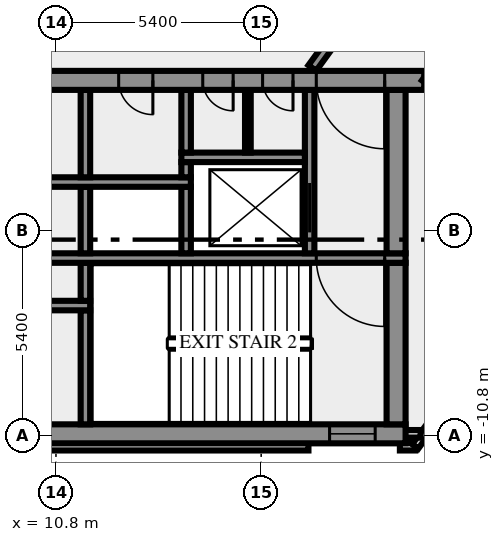
"""IFC4 building model, lengths in metres.
Left out: names, types, materials, properties, quantities, classifications, styles, units other than length and angle.
Written with IfcOpenShell. Run it as: python <this file> out.ifc"""

import sys

from ifc_helpers import new_model, si_unit, direction, frame, frame_2d, origin, place, context, subcontext, project, spatial, rectangle, extrude, element, fill, save


model = new_model("IFC4")
c1 = context("Model", 3, precision=1e-05, world=origin(), true_north=direction((0.0, 1.0)))
c2 = subcontext(c1, "Body", "Model", "MODEL_VIEW")
j1 = project(units=[si_unit("LENGTHUNIT", "METRE"), si_unit("PLANEANGLEUNIT", "RADIAN")], contexts=[c1])
p1 = place(None, origin())
s1 = spatial("IfcSite", under=j1, at=p1, CompositionType="ELEMENT")
p2 = place(p1, origin())
s2 = spatial("IfcBuilding", under=s1, at=p2, CompositionType="ELEMENT")
p3 = place(p2, frame((0.0, 0.0, 323.0)))
s3 = spatial("IfcBuildingStorey", under=s2, at=p3, CompositionType="ELEMENT", Elevation=323.0)
p4 = place(p3, frame((-17.444, -11.088, 0.0), z_axis=(0.0, 0.0, 1.0), x_axis=(1.0, 0.0, 0.0)))
e1 = element("IfcWall", 1, at=p4, inside=s3, PredefinedType="SOLIDWALL", context=c2, shape_type="SweptSolid", body=[
    extrude(rectangle(XDim=34.888, YDim=0.2, at=frame_2d((17.444, 0.0))), origin(), (0.0, 0.0, 1.0), 3.65),
])
p5 = place(p3, frame((19.85, -11.088, 0.0), z_axis=(0.0, 0.0, 1.0), x_axis=(1.0, 0.0, 0.0)))
e2 = element("IfcWall", 2, at=p5, inside=s3, PredefinedType="SOLIDWALL", context=c2, shape_type="SweptSolid", body=[
    extrude(rectangle(XDim=0.406, YDim=0.2, at=frame_2d((0.203, 0.0))), origin(), (0.0, 0.0, 1.0), 3.65),
])
p6 = place(p3, frame((20.253, -11.083, 0.0), z_axis=(0.0, 0.0, 1.0), x_axis=(0.587766567315, 0.809030569476, 0.0)))
e3 = element("IfcWall", 3, at=p6, inside=s3, PredefinedType="SOLIDWALL", context=c2, shape_type="SweptSolid", body=[
    extrude(rectangle(XDim=2.688, YDim=0.2, at=frame_2d((1.344, 0.0))), origin(), (0.0, 0.0, 1.0), 3.65),
])
p7 = place(p3, frame((19.98, -10.75, 0.0), z_axis=(0.0, 0.0, 1.0), x_axis=(1.0, 0.0, 0.0)))
e4 = element("IfcWall", 4, at=p7, inside=s3, PredefinedType="SOLIDWALL", context=c2, shape_type="SweptSolid", body=[
    extrude(rectangle(XDim=0.417, YDim=0.2, at=frame_2d((0.208, 0.0))), origin(), (0.0, 0.0, 1.0), 3.65),
])
p8 = place(p3, frame((-20.0, -10.75, 0.0), z_axis=(0.0, 0.0, 1.0), x_axis=(1.0, 0.0, 0.0)))
e5 = element("IfcWall", 5, at=p8, inside=s3, PredefinedType="SHEAR", context=c2, shape_type="SweptSolid", body=[
    extrude(rectangle(XDim=40.0, YDim=0.5, at=frame_2d((20.0, 0.0))), origin(), (0.0, 0.0, 1.0), 3.65),
])
p9 = place(p8, frame((0.8, 0.0, 1.0)))
e6 = element("IfcOpeningElement", 6, at=p9, cuts=e5, PredefinedType="OPENING", context=c2, shape_type="SweptSolid", body=[
    extrude(rectangle(XDim=1.2, YDim=1.2, at=frame_2d((0.6, 0.6))), frame((0.0, 0.26, 0.0), z_axis=(0.0, -1.0, 0.0), x_axis=(1.0, 0.0, 0.0)), (0.0, 0.0, 1.0), 0.52),
])
p10 = place(p8, frame((38.0, 0.0, 1.0)))
e7 = element("IfcOpeningElement", 7, at=p10, cuts=e5, PredefinedType="OPENING", context=c2, shape_type="SweptSolid", body=[
    extrude(rectangle(XDim=1.2, YDim=1.2, at=frame_2d((0.6, 0.6))), frame((0.0, 0.26, 0.0), z_axis=(0.0, -1.0, 0.0), x_axis=(1.0, 0.0, 0.0)), (0.0, 0.0, 1.0), 0.52),
])
p11 = place(p3, frame((11.575, -10.5, 0.0), z_axis=(0.0, 0.0, 1.0), x_axis=(0.0, 1.0, 0.0)))
e8 = element("IfcWall", 8, at=p11, inside=s3, PredefinedType="SHEAR", context=c2, shape_type="SweptSolid", body=[
    extrude(rectangle(XDim=3.0, YDim=0.25, at=frame_2d((1.5, 0.0))), origin(), (0.0, 0.0, 1.0), 3.65),
])
p12 = place(p3, frame((19.75, -10.5, 0.0), z_axis=(0.0, 0.0, 1.0), x_axis=(0.0, 1.0, 0.0)))
e9 = element("IfcWall", 9, at=p12, inside=s3, PredefinedType="SHEAR", context=c2, shape_type="SweptSolid", body=[
    extrude(rectangle(XDim=4.25, YDim=0.5, at=frame_2d((2.125, 0.0))), origin(), (0.0, 0.0, 1.0), 3.65),
])
p13 = place(p3, frame((11.7, -7.375, 0.0), z_axis=(0.0, 0.0, 1.0), x_axis=(-1.0, 0.0, 0.0)))
e10 = element("IfcWall", 10, at=p13, inside=s3, PredefinedType="SHEAR", context=c2, shape_type="SweptSolid", body=[
    extrude(rectangle(XDim=23.4, YDim=0.25, at=frame_2d((11.7, 0.0))), origin(), (0.0, 0.0, 1.0), 3.65),
])
p14 = place(p13, frame((22.225, 0.0, 0.0)))
e11 = element("IfcOpeningElement", 11, at=p14, cuts=e10, PredefinedType="OPENING", context=c2, shape_type="SweptSolid", body=[
    extrude(rectangle(XDim=0.8, YDim=2.1, at=frame_2d((0.4, 1.05))), frame((0.0, 0.135, 0.0), z_axis=(0.0, -1.0, 0.0), x_axis=(1.0, 0.0, 0.0)), (0.0, 0.0, 1.0), 0.27),
])
p15 = place(p13, frame((20.2, 0.0, 0.0)))
e12 = element("IfcOpeningElement", 12, at=p15, cuts=e10, PredefinedType="OPENING", context=c2, shape_type="SweptSolid", body=[
    extrude(rectangle(XDim=1.1, YDim=2.1, at=frame_2d((0.55, 1.05))), frame((0.0, 0.135, 0.0), z_axis=(0.0, -1.0, 0.0), x_axis=(1.0, 0.0, 0.0)), (0.0, 0.0, 1.0), 0.27),
])
p16 = place(p13, frame((17.7, 0.0, 0.0)))
e13 = element("IfcOpeningElement", 13, at=p16, cuts=e10, PredefinedType="OPENING", context=c2, shape_type="SweptSolid", body=[
    extrude(rectangle(XDim=1.1, YDim=2.1, at=frame_2d((0.55, 1.05))), frame((0.0, 0.135, 0.0), z_axis=(0.0, -1.0, 0.0), x_axis=(1.0, 0.0, 0.0)), (0.0, 0.0, 1.0), 0.27),
])
p17 = place(p13, frame((15.975, 0.0, 0.0)))
e14 = element("IfcOpeningElement", 14, at=p17, cuts=e10, PredefinedType="OPENING", context=c2, shape_type="SweptSolid", body=[
    extrude(rectangle(XDim=0.8, YDim=2.1, at=frame_2d((0.4, 1.05))), frame((0.0, 0.135, 0.0), z_axis=(0.0, -1.0, 0.0), x_axis=(1.0, 0.0, 0.0)), (0.0, 0.0, 1.0), 0.27),
])
p18 = place(p13, frame((14.5, 0.0, 0.0)))
e15 = element("IfcOpeningElement", 15, at=p18, cuts=e10, PredefinedType="OPENING", context=c2, shape_type="SweptSolid", body=[
    extrude(rectangle(XDim=0.9, YDim=2.1, at=frame_2d((0.45, 1.05))), frame((0.0, 0.135, 0.0), z_axis=(0.0, -1.0, 0.0), x_axis=(1.0, 0.0, 0.0)), (0.0, 0.0, 1.0), 0.27),
])
p19 = place(p13, frame((12.95, 0.0, 0.0)))
e16 = element("IfcOpeningElement", 16, at=p19, cuts=e10, PredefinedType="OPENING", context=c2, shape_type="SweptSolid", body=[
    extrude(rectangle(XDim=0.9, YDim=2.1, at=frame_2d((0.45, 1.05))), frame((0.0, 0.135, 0.0), z_axis=(0.0, -1.0, 0.0), x_axis=(1.0, 0.0, 0.0)), (0.0, 0.0, 1.0), 0.27),
])
p20 = place(p13, frame((11.475, 0.0, 0.0)))
e17 = element("IfcOpeningElement", 17, at=p20, cuts=e10, PredefinedType="OPENING", context=c2, shape_type="SweptSolid", body=[
    extrude(rectangle(XDim=0.9, YDim=2.1, at=frame_2d((0.45, 1.05))), frame((0.0, 0.135, 0.0), z_axis=(0.0, -1.0, 0.0), x_axis=(1.0, 0.0, 0.0)), (0.0, 0.0, 1.0), 0.27),
])
p21 = place(p13, frame((10.45, 0.0, 0.0)))
e18 = element("IfcOpeningElement", 18, at=p21, cuts=e10, PredefinedType="OPENING", context=c2, shape_type="SweptSolid", body=[
    extrude(rectangle(XDim=0.5, YDim=2.1, at=frame_2d((0.25, 1.05))), frame((0.0, 0.135, 0.0), z_axis=(0.0, -1.0, 0.0), x_axis=(1.0, 0.0, 0.0)), (0.0, 0.0, 1.0), 0.27),
])
p22 = place(p13, frame((7.713, 0.0, 0.0)))
e19 = element("IfcOpeningElement", 19, at=p22, cuts=e10, PredefinedType="OPENING", context=c2, shape_type="SweptSolid", body=[
    extrude(rectangle(XDim=0.9, YDim=2.1, at=frame_2d((0.45, 1.05))), frame((0.0, 0.135, 0.0), z_axis=(0.0, -1.0, 0.0), x_axis=(1.0, 0.0, 0.0)), (0.0, 0.0, 1.0), 0.27),
])
p23 = place(p13, frame((4.15, 0.0, 0.0)))
e20 = element("IfcOpeningElement", 20, at=p23, cuts=e10, PredefinedType="OPENING", context=c2, shape_type="SweptSolid", body=[
    extrude(rectangle(XDim=0.9, YDim=2.1, at=frame_2d((0.45, 1.05))), frame((0.0, 0.135, 0.0), z_axis=(0.0, -1.0, 0.0), x_axis=(1.0, 0.0, 0.0)), (0.0, 0.0, 1.0), 0.27),
])
p24 = place(p13, frame((1.138, 0.0, 0.0)))
e21 = element("IfcOpeningElement", 21, at=p24, cuts=e10, PredefinedType="OPENING", context=c2, shape_type="SweptSolid", body=[
    extrude(rectangle(XDim=0.9, YDim=2.1, at=frame_2d((0.45, 1.05))), frame((0.0, 0.135, 0.0), z_axis=(0.0, -1.0, 0.0), x_axis=(1.0, 0.0, 0.0)), (0.0, 0.0, 1.0), 0.27),
])
p25 = place(p3, frame((11.575, -7.25, 0.0), z_axis=(0.0, 0.0, 1.0), x_axis=(0.0, 1.0, 0.0)))
e22 = element("IfcWall", 22, at=p25, inside=s3, PredefinedType="SHEAR", context=c2, shape_type="SweptSolid", body=[
    extrude(rectangle(XDim=1.0, YDim=0.25, at=frame_2d((0.5, 0.0))), origin(), (0.0, 0.0, 1.0), 3.65),
])
p26 = place(p3, frame((20.0, -6.125, 0.0), z_axis=(0.0, 0.0, 1.0), x_axis=(-1.0, 0.0, 0.0)))
e23 = element("IfcWall", 23, at=p26, inside=s3, PredefinedType="SHEAR", context=c2, shape_type="SweptSolid", body=[
    extrude(rectangle(XDim=10.8, YDim=0.25, at=frame_2d((5.4, 0.0))), origin(), (0.0, 0.0, 1.0), 3.65),
])
p27 = place(p26, frame((0.55, 0.0, 0.0)))
e24 = element("IfcOpeningElement", 24, at=p27, cuts=e23, PredefinedType="OPENING", context=c2, shape_type="SweptSolid", body=[
    extrude(rectangle(XDim=1.8, YDim=2.1, at=frame_2d((0.9, 1.05))), frame((0.0, 0.135, 0.0), z_axis=(0.0, -1.0, 0.0), x_axis=(1.0, 0.0, 0.0)), (0.0, 0.0, 1.0), 0.27),
])
for number, where, z_axis, x_axis in (
    (25, (11.575, -6.0, 0.0), (0.0, 0.0, 1.0), (0.0, 1.0, 0.0)),
    (26, (14.225, -6.0, 0.0), (0.0, 0.0, 1.0), (0.0, 1.0, 0.0)),
):
    element("IfcWall", number, at=place(p3, frame(where, z_axis=z_axis, x_axis=x_axis)), inside=s3, PredefinedType="SHEAR", context=c2, shape_type="SweptSolid", body=[
        extrude(rectangle(XDim=1.75, YDim=0.25, at=frame_2d((0.875, 0.0))), origin(), (0.0, 0.0, 1.0), 3.65),
    ])
p28 = place(p3, frame((17.475, -6.0, 0.0), z_axis=(0.0, 0.0, 1.0), x_axis=(0.0, 1.0, 0.0)))
e27 = element("IfcWall", 27, at=p28, inside=s3, PredefinedType="SHEAR", context=c2, shape_type="SweptSolid", body=[
    extrude(rectangle(XDim=4.3, YDim=0.25, at=frame_2d((2.15, 0.0))), origin(), (0.0, 0.0, 1.0), 3.65),
])
p29 = place(p28, frame((0.55, 0.0, 0.0)))
e28 = element("IfcOpeningElement", 28, at=p29, cuts=e27, PredefinedType="OPENING", context=c2, shape_type="SweptSolid", body=[
    extrude(rectangle(XDim=1.3, YDim=2.1, at=frame_2d((0.65, 1.05))), frame((0.0, 0.135, 0.0), z_axis=(0.0, -1.0, 0.0), x_axis=(1.0, 0.0, 0.0)), (0.0, 0.0, 1.0), 0.27),
])
p30 = place(p3, frame((19.75, -6.0, 0.0), z_axis=(0.0, 0.0, 1.0), x_axis=(0.0, 1.0, 0.0)))
e29 = element("IfcWall", 29, at=p30, inside=s3, PredefinedType="SHEAR", context=c2, shape_type="SweptSolid", body=[
    extrude(rectangle(XDim=4.3, YDim=0.5, at=frame_2d((2.15, 0.0))), origin(), (0.0, 0.0, 1.0), 3.65),
])
p31 = place(p3, frame((-0.6, -4.125, 0.0), z_axis=(0.0, 0.0, 1.0), x_axis=(1.0, 0.0, 0.0)))
e30 = element("IfcWall", 30, at=p31, inside=s3, PredefinedType="SHEAR", context=c2, shape_type="SweptSolid", body=[
    extrude(rectangle(XDim=14.95, YDim=0.25, at=frame_2d((7.475, 0.0))), origin(), (0.0, 0.0, 1.0), 3.65),
])
p32 = place(p31, frame((2.75, 0.0, 0.0)))
e31 = element("IfcOpeningElement", 31, at=p32, cuts=e30, PredefinedType="OPENING", context=c2, shape_type="SweptSolid", body=[
    extrude(rectangle(XDim=1.3, YDim=2.1, at=frame_2d((0.65, 1.05))), frame((0.0, 0.135, 0.0), z_axis=(0.0, -1.0, 0.0), x_axis=(1.0, 0.0, 0.0)), (0.0, 0.0, 1.0), 0.27),
])
p33 = place(p3, frame((11.575, -4.0, 0.0), z_axis=(0.0, 0.0, 1.0), x_axis=(0.0, 1.0, 0.0)))
e32 = element("IfcWall", 32, at=p33, inside=s3, PredefinedType="SHEAR", context=c2, shape_type="SweptSolid", body=[
    extrude(rectangle(XDim=2.3, YDim=0.25, at=frame_2d((1.15, 0.0))), origin(), (0.0, 0.0, 1.0), 3.65),
])
p34 = place(p3, frame((14.225, -4.0, 0.0), z_axis=(0.0, 0.0, 1.0), x_axis=(0.0, 1.0, 0.0)))
e33 = element("IfcWall", 33, at=p34, inside=s3, PredefinedType="SHEAR", context=c2, shape_type="SweptSolid", body=[
    extrude(rectangle(XDim=0.4, YDim=0.25, at=frame_2d((0.2, 0.0))), origin(), (0.0, 0.0, 1.0), 3.65),
])
p35 = place(p3, frame((14.1, -3.475, 0.0), z_axis=(0.0, 0.0, 1.0), x_axis=(1.0, 0.0, 0.0)))
e34 = element("IfcWall", 34, at=p35, inside=s3, PredefinedType="SHEAR", context=c2, shape_type="SweptSolid", body=[
    extrude(rectangle(XDim=3.25, YDim=0.25, at=frame_2d((1.625, 0.0))), origin(), (0.0, 0.0, 1.0), 3.65),
])
p36 = place(p3, frame((14.225, -3.35, 0.0), z_axis=(0.0, 0.0, 1.0), x_axis=(0.0, 1.0, 0.0)))
e35 = element("IfcWall", 35, at=p36, inside=s3, PredefinedType="SHEAR", context=c2, shape_type="SweptSolid", body=[
    extrude(rectangle(XDim=1.65, YDim=0.25, at=frame_2d((0.825, 0.0))), origin(), (0.0, 0.0, 1.0), 3.65),
])
p37 = place(p3, frame((15.85, -3.35, 0.0), z_axis=(0.0, 0.0, 1.0), x_axis=(0.0, 1.0, 0.0)))
e36 = element("IfcWall", 36, at=p37, inside=s3, PredefinedType="PARTITIONING", context=c2, shape_type="SweptSolid", body=[
    extrude(rectangle(XDim=1.65, YDim=0.15, at=frame_2d((0.825, 0.0))), origin(), (0.0, 0.0, 1.0), 3.65),
])
p38 = place(p3, frame((20.49, -1.45, 0.0), z_axis=(0.0, 0.0, 1.0), x_axis=(-1.0, 0.0, 0.0)))
e37 = element("IfcWall", 37, at=p38, inside=s3, PredefinedType="SHEAR", context=c2, shape_type="SweptSolid", body=[
    extrude(rectangle(XDim=40.98, YDim=0.5, at=frame_2d((20.49, 0.0))), origin(), (0.0, 0.0, 1.0), 3.65),
])
p39 = place(p38, frame((38.14, 0.0, 0.0)))
e38 = element("IfcOpeningElement", 38, at=p39, cuts=e37, PredefinedType="OPENING", context=c2, shape_type="SweptSolid", body=[
    extrude(rectangle(XDim=1.8, YDim=2.1, at=frame_2d((0.9, 1.05))), frame((0.0, 0.26, 0.0), z_axis=(0.0, -1.0, 0.0), x_axis=(1.0, 0.0, 0.0)), (0.0, 0.0, 1.0), 0.52),
])
p40 = place(p38, frame((35.89, 0.0, 0.0)))
e39 = element("IfcOpeningElement", 39, at=p40, cuts=e37, PredefinedType="OPENING", context=c2, shape_type="SweptSolid", body=[
    extrude(rectangle(XDim=0.9, YDim=2.1, at=frame_2d((0.45, 1.05))), frame((0.0, 0.26, 0.0), z_axis=(0.0, -1.0, 0.0), x_axis=(1.0, 0.0, 0.0)), (0.0, 0.0, 1.0), 0.52),
])
p41 = place(p38, frame((32.94, 0.0, 0.0)))
e40 = element("IfcOpeningElement", 40, at=p41, cuts=e37, PredefinedType="OPENING", context=c2, shape_type="SweptSolid", body=[
    extrude(rectangle(XDim=0.9, YDim=2.1, at=frame_2d((0.45, 1.05))), frame((0.0, 0.26, 0.0), z_axis=(0.0, -1.0, 0.0), x_axis=(1.0, 0.0, 0.0)), (0.0, 0.0, 1.0), 0.52),
])
p42 = place(p38, frame((31.015, 0.0, 0.0)))
e41 = element("IfcOpeningElement", 41, at=p42, cuts=e37, PredefinedType="OPENING", context=c2, shape_type="SweptSolid", body=[
    extrude(rectangle(XDim=0.8, YDim=2.1, at=frame_2d((0.4, 1.05))), frame((0.0, 0.26, 0.0), z_axis=(0.0, -1.0, 0.0), x_axis=(1.0, 0.0, 0.0)), (0.0, 0.0, 1.0), 0.52),
])
p43 = place(p38, frame((24.765, 0.0, 0.0)))
e42 = element("IfcOpeningElement", 42, at=p43, cuts=e37, PredefinedType="OPENING", context=c2, shape_type="SweptSolid", body=[
    extrude(rectangle(XDim=0.8, YDim=2.1, at=frame_2d((0.4, 1.05))), frame((0.0, 0.26, 0.0), z_axis=(0.0, -1.0, 0.0), x_axis=(1.0, 0.0, 0.0)), (0.0, 0.0, 1.0), 0.52),
])
p44 = place(p38, frame((21.765, 0.0, 0.0)))
e43 = element("IfcOpeningElement", 43, at=p44, cuts=e37, PredefinedType="OPENING", context=c2, shape_type="SweptSolid", body=[
    extrude(rectangle(XDim=2.0, YDim=2.1, at=frame_2d((1.0, 1.05))), frame((0.0, 0.26, 0.0), z_axis=(0.0, -1.0, 0.0), x_axis=(1.0, 0.0, 0.0)), (0.0, 0.0, 1.0), 0.52),
])
p45 = place(p38, frame((15.103, 0.0, 0.0)))
e44 = element("IfcOpeningElement", 44, at=p45, cuts=e37, PredefinedType="OPENING", context=c2, shape_type="SweptSolid", body=[
    extrude(rectangle(XDim=0.9, YDim=2.1, at=frame_2d((0.45, 1.05))), frame((0.0, 0.26, 0.0), z_axis=(0.0, -1.0, 0.0), x_axis=(1.0, 0.0, 0.0)), (0.0, 0.0, 1.0), 0.52),
])
p46 = place(p38, frame((13.04, 0.0, 0.0)))
e45 = element("IfcOpeningElement", 45, at=p46, cuts=e37, PredefinedType="OPENING", context=c2, shape_type="SweptSolid", body=[
    extrude(rectangle(XDim=0.9, YDim=2.1, at=frame_2d((0.45, 1.05))), frame((0.0, 0.26, 0.0), z_axis=(0.0, -1.0, 0.0), x_axis=(1.0, 0.0, 0.0)), (0.0, 0.0, 1.0), 0.52),
])
p47 = place(p38, frame((10.177, 0.0, 0.0)))
e46 = element("IfcOpeningElement", 46, at=p47, cuts=e37, PredefinedType="OPENING", context=c2, shape_type="SweptSolid", body=[
    extrude(rectangle(XDim=0.9, YDim=2.1, at=frame_2d((0.45, 1.05))), frame((0.0, 0.26, 0.0), z_axis=(0.0, -1.0, 0.0), x_axis=(1.0, 0.0, 0.0)), (0.0, 0.0, 1.0), 0.52),
])
p48 = place(p38, frame((7.14, 0.0, 0.0)))
e47 = element("IfcOpeningElement", 47, at=p48, cuts=e37, PredefinedType="OPENING", context=c2, shape_type="SweptSolid", body=[
    extrude(rectangle(XDim=0.9, YDim=2.1, at=frame_2d((0.45, 1.05))), frame((0.0, 0.26, 0.0), z_axis=(0.0, -1.0, 0.0), x_axis=(1.0, 0.0, 0.0)), (0.0, 0.0, 1.0), 0.52),
])
p49 = place(p38, frame((5.028, 0.0, 0.0)))
e48 = element("IfcOpeningElement", 48, at=p49, cuts=e37, PredefinedType="OPENING", context=c2, shape_type="SweptSolid", body=[
    extrude(rectangle(XDim=0.8, YDim=2.1, at=frame_2d((0.4, 1.05))), frame((0.0, 0.26, 0.0), z_axis=(0.0, -1.0, 0.0), x_axis=(1.0, 0.0, 0.0)), (0.0, 0.0, 1.0), 0.52),
])
p50 = place(p38, frame((3.452, 0.0, 0.0)))
e49 = element("IfcOpeningElement", 49, at=p50, cuts=e37, PredefinedType="OPENING", context=c2, shape_type="SweptSolid", body=[
    extrude(rectangle(XDim=0.8, YDim=2.1, at=frame_2d((0.4, 1.05))), frame((0.0, 0.26, 0.0), z_axis=(0.0, -1.0, 0.0), x_axis=(1.0, 0.0, 0.0)), (0.0, 0.0, 1.0), 0.52),
])
p51 = place(p38, frame((1.04, 0.0, 0.0)))
e50 = element("IfcOpeningElement", 50, at=p51, cuts=e37, PredefinedType="OPENING", context=c2, shape_type="SweptSolid", body=[
    extrude(rectangle(XDim=1.8, YDim=2.1, at=frame_2d((0.9, 1.05))), frame((0.0, 0.26, 0.0), z_axis=(0.0, -1.0, 0.0), x_axis=(1.0, 0.0, 0.0)), (0.0, 0.0, 1.0), 0.52),
])
p52 = place(p3, frame((17.545, -1.125, 0.0), z_axis=(0.0, 0.0, 1.0), x_axis=(0.58779555165, 0.809009511354, 0.0)))
e51 = element("IfcWall", 51, at=p52, inside=s3, PredefinedType="SOLIDWALL", context=c2, shape_type="SweptSolid", body=[
    extrude(rectangle(XDim=18.103, YDim=0.25, at=frame_2d((9.052, 0.0))), origin(), (0.0, 0.0, 1.0), 3.65),
])
p53 = place(p52, frame((3.441, 0.0, 0.0)))
e52 = element("IfcOpeningElement", 52, at=p53, cuts=e51, PredefinedType="OPENING", context=c2, shape_type="SweptSolid", body=[
    extrude(rectangle(XDim=0.9, YDim=2.1, at=frame_2d((0.45, 1.05))), frame((0.0, 0.135, 0.0), z_axis=(0.0, -1.0, 0.0), x_axis=(1.0, 0.0, 0.0)), (0.0, 0.0, 1.0), 0.27),
])
p54 = place(p3, frame((30.183, 11.761, 0.0), z_axis=(0.0, 0.0, 1.0), x_axis=(-0.587781762867, -0.80901952958, 0.0)))
e53 = element("IfcWall", 53, at=p54, inside=s3, PredefinedType="SOLIDWALL", context=c2, shape_type="SweptSolid", body=[
    extrude(rectangle(XDim=16.42, YDim=0.25, at=frame_2d((8.21, 0.0))), origin(), (0.0, 0.0, 1.0), 3.65),
])
p55 = place(p54, frame((0.225, 0.0, 0.0)))
e54 = element("IfcOpeningElement", 54, at=p55, cuts=e53, PredefinedType="OPENING", context=c2, shape_type="SweptSolid", body=[
    extrude(rectangle(XDim=0.9, YDim=2.1, at=frame_2d((0.45, 1.05))), frame((0.0, 0.135, 0.0), z_axis=(0.0, -1.0, 0.0), x_axis=(1.0, 0.0, 0.0)), (0.0, 0.0, 1.0), 0.27),
])
p56 = place(p54, frame((6.605, 0.0, 0.0)))
e55 = element("IfcOpeningElement", 55, at=p56, cuts=e53, PredefinedType="OPENING", context=c2, shape_type="SweptSolid", body=[
    extrude(rectangle(XDim=0.9, YDim=2.1, at=frame_2d((0.45, 1.05))), frame((0.0, 0.135, 0.0), z_axis=(0.0, -1.0, 0.0), x_axis=(1.0, 0.0, 0.0)), (0.0, 0.0, 1.0), 0.27),
])
p57 = place(p10, origin())
e56 = element("IfcWindow", 56, at=p57, inside=s3, PartitioningType="SINGLE_PANEL", PredefinedType="WINDOW", context=c2, shape_type="SweptSolid", body=[
    extrude(rectangle(XDim=1.2, YDim=1.2, at=frame_2d((0.6, 0.6))), frame((0.0, 0.03, 0.0), z_axis=(0.0, -1.0, 0.0), x_axis=(1.0, 0.0, 0.0)), (0.0, 0.0, 1.0), 0.06),
])
fill(e7, e56)
p58 = place(p27, origin())
e57 = element("IfcDoor", 57, at=p58, inside=s3, OperationType="DOUBLE_DOOR_SINGLE_SWING", PredefinedType="DOOR", context=c2, shape_type="SweptSolid", body=[
    extrude(rectangle(XDim=1.8, YDim=2.1, at=frame_2d((0.9, 1.05))), frame((0.0, 0.025, 0.0), z_axis=(0.0, -1.0, 0.0), x_axis=(1.0, 0.0, 0.0)), (0.0, 0.0, 1.0), 0.05),
])
fill(e24, e57)
p59 = place(p29, origin())
e58 = element("IfcDoor", 58, at=p59, inside=s3, OperationType="DOUBLE_DOOR_SLIDING", PredefinedType="DOOR", context=c2, shape_type="SweptSolid", body=[
    extrude(rectangle(XDim=1.3, YDim=2.1, at=frame_2d((0.65, 1.05))), frame((0.0, 0.025, 0.0), z_axis=(0.0, -1.0, 0.0), x_axis=(1.0, 0.0, 0.0)), (0.0, 0.0, 1.0), 0.05),
])
fill(e28, e58)
p60 = place(p48, origin())
e59 = element("IfcDoor", 59, at=p60, inside=s3, OperationType="SINGLE_SWING_LEFT", PredefinedType="DOOR", context=c2, shape_type="SweptSolid", body=[
    extrude(rectangle(XDim=0.9, YDim=2.1, at=frame_2d((0.45, 1.05))), frame((0.0, 0.025, 0.0), z_axis=(0.0, -1.0, 0.0), x_axis=(1.0, 0.0, 0.0)), (0.0, 0.0, 1.0), 0.05),
])
fill(e47, e59)
p61 = place(p49, origin())
e60 = element("IfcDoor", 60, at=p61, inside=s3, OperationType="SINGLE_SWING_LEFT", PredefinedType="DOOR", context=c2, shape_type="SweptSolid", body=[
    extrude(rectangle(XDim=0.8, YDim=2.1, at=frame_2d((0.4, 1.05))), frame((0.0, 0.025, 0.0), z_axis=(0.0, -1.0, 0.0), x_axis=(1.0, 0.0, 0.0)), (0.0, 0.0, 1.0), 0.05),
])
fill(e48, e60)
p62 = place(p50, origin())
e61 = element("IfcDoor", 61, at=p62, inside=s3, OperationType="SINGLE_SWING_LEFT", PredefinedType="DOOR", context=c2, shape_type="SweptSolid", body=[
    extrude(rectangle(XDim=0.8, YDim=2.1, at=frame_2d((0.4, 1.05))), frame((0.0, 0.025, 0.0), z_axis=(0.0, -1.0, 0.0), x_axis=(1.0, 0.0, 0.0)), (0.0, 0.0, 1.0), 0.05),
])
fill(e49, e61)
p63 = place(p51, origin())
e62 = element("IfcDoor", 62, at=p63, inside=s3, OperationType="DOUBLE_DOOR_SINGLE_SWING", PredefinedType="DOOR", context=c2, shape_type="SweptSolid", body=[
    extrude(rectangle(XDim=1.8, YDim=2.1, at=frame_2d((0.9, 1.05))), frame((0.0, 0.025, 0.0), z_axis=(0.0, -1.0, 0.0), x_axis=(1.0, 0.0, 0.0)), (0.0, 0.0, 1.0), 0.05),
])
fill(e50, e62)
save(model, sys.argv[1])
